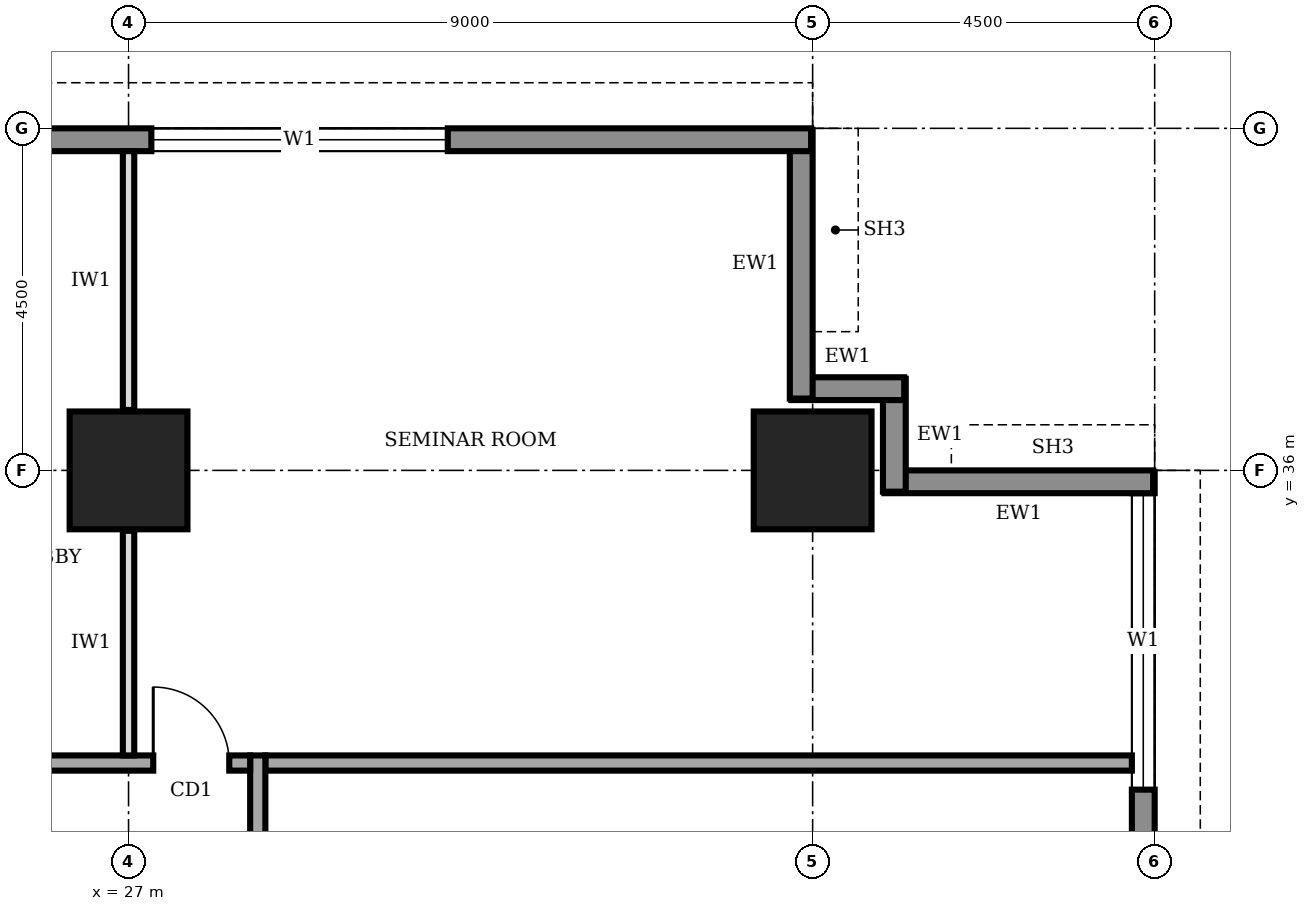
"""IFC4 building model, lengths in metres.
Left out: names, types, materials, properties, quantities, classifications, styles, units other than length and angle.
Written with IfcOpenShell. Run it as: python <this file> out.ifc"""

import sys

from ifc_helpers import new_model, si_unit, direction, frame, frame_2d, origin, origin_2d, place, context, subcontext, project, spatial, rectangle, extrude, element, fill, save


model = new_model("IFC4")
c1 = context("Model", 3, precision=1e-05, world=origin(), true_north=direction((0.0, 1.0)))
c2 = subcontext(c1, "Body", "Model", "MODEL_VIEW")
j1 = project(units=[si_unit("LENGTHUNIT", "METRE"), si_unit("PLANEANGLEUNIT", "RADIAN")], contexts=[c1])
p1 = place(None, origin())
s1 = spatial("IfcSite", under=j1, at=p1, CompositionType="ELEMENT")
p2 = place(p1, origin())
s2 = spatial("IfcBuilding", under=s1, at=p2, CompositionType="ELEMENT")
p3 = place(p2, frame((0.0, 0.0, 217.0)))
s3 = spatial("IfcBuildingStorey", under=s2, at=p3, CompositionType="ELEMENT", Elevation=217.0)
for number, where, z_axis, x_axis in (
    (1, (27.0, 36.0, 0.0), (0.0, 0.0, 1.0), (1.0, 0.0, 0.0)),
    (2, (36.0, 36.0, 0.0), (0.0, 0.0, 1.0), (1.0, 0.0, 0.0)),
):
    element("IfcColumn", number, at=place(p3, frame(where, z_axis=z_axis, x_axis=x_axis)), inside=s3, PredefinedType="COLUMN", context=c2, shape_type="SweptSolid", body=[
        extrude(rectangle(XDim=1.55, YDim=1.55, at=origin_2d()), origin(), (0.0, 0.0, 1.0), 4.0),
    ])
p4 = place(p3, frame((40.35, 4.52, 0.0), z_axis=(0.0, 0.0, 1.0), x_axis=(0.0, 1.0, 0.0)))
e3 = element("IfcWall", 3, at=p4, inside=s3, PredefinedType="STANDARD", context=c2, shape_type="SweptSolid", body=[
    extrude(rectangle(XDim=31.46, YDim=0.3, at=frame_2d((15.73, 0.0))), origin(), (0.0, 0.0, 1.0), 3.75),
])
p5 = place(p4, frame((4.78, 0.0, 0.9)))
e4 = element("IfcOpeningElement", 4, at=p5, cuts=e3, PredefinedType="OPENING", context=c2, shape_type="SweptSolid", body=[
    extrude(rectangle(XDim=3.9, YDim=2.2, at=frame_2d((1.95, 1.1))), frame((0.0, 0.16, 0.0), z_axis=(0.0, -1.0, 0.0), x_axis=(1.0, 0.0, 0.0)), (0.0, 0.0, 1.0), 0.32),
])
p6 = place(p4, frame((9.28, 0.0, 0.9)))
e5 = element("IfcOpeningElement", 5, at=p6, cuts=e3, PredefinedType="OPENING", context=c2, shape_type="SweptSolid", body=[
    extrude(rectangle(XDim=3.9, YDim=2.2, at=frame_2d((1.95, 1.1))), frame((0.0, 0.16, 0.0), z_axis=(0.0, -1.0, 0.0), x_axis=(1.0, 0.0, 0.0)), (0.0, 0.0, 1.0), 0.32),
])
p7 = place(p4, frame((13.78, 0.0, 0.9)))
e6 = element("IfcOpeningElement", 6, at=p7, cuts=e3, PredefinedType="OPENING", context=c2, shape_type="SweptSolid", body=[
    extrude(rectangle(XDim=3.9, YDim=2.2, at=frame_2d((1.95, 1.1))), frame((0.0, 0.16, 0.0), z_axis=(0.0, -1.0, 0.0), x_axis=(1.0, 0.0, 0.0)), (0.0, 0.0, 1.0), 0.32),
])
p8 = place(p4, frame((18.28, 0.0, 0.9)))
e7 = element("IfcOpeningElement", 7, at=p8, cuts=e3, PredefinedType="OPENING", context=c2, shape_type="SweptSolid", body=[
    extrude(rectangle(XDim=3.9, YDim=2.2, at=frame_2d((1.95, 1.1))), frame((0.0, 0.16, 0.0), z_axis=(0.0, -1.0, 0.0), x_axis=(1.0, 0.0, 0.0)), (0.0, 0.0, 1.0), 0.32),
])
p9 = place(p4, frame((22.78, 0.0, 0.9)))
e8 = element("IfcOpeningElement", 8, at=p9, cuts=e3, PredefinedType="OPENING", context=c2, shape_type="SweptSolid", body=[
    extrude(rectangle(XDim=3.9, YDim=2.2, at=frame_2d((1.95, 1.1))), frame((0.0, 0.16, 0.0), z_axis=(0.0, -1.0, 0.0), x_axis=(1.0, 0.0, 0.0)), (0.0, 0.0, 1.0), 0.32),
])
p10 = place(p4, frame((27.28, 0.0, 0.9)))
e9 = element("IfcOpeningElement", 9, at=p10, cuts=e3, PredefinedType="OPENING", context=c2, shape_type="SweptSolid", body=[
    extrude(rectangle(XDim=3.9, YDim=2.2, at=frame_2d((1.95, 1.1))), frame((0.0, 0.16, 0.0), z_axis=(0.0, -1.0, 0.0), x_axis=(1.0, 0.0, 0.0)), (0.0, 0.0, 1.0), 0.32),
])
p11 = place(p3, frame((40.48, 35.85, 0.0), z_axis=(0.0, 0.0, 1.0), x_axis=(-1.0, 0.0, 0.0)))
e10 = element("IfcWall", 10, at=p11, inside=s3, PredefinedType="STANDARD", context=c2, shape_type="SweptSolid", body=[
    extrude(rectangle(XDim=3.535, YDim=0.3, at=frame_2d((1.768, 0.0))), origin(), (0.0, 0.0, 1.0), 2.85),
])
for number, where, z_axis, x_axis in (
    (11, (37.075, 35.72, 0.0), (0.0, 0.0, 1.0), (0.0, 1.0, 0.0)),
    (12, (37.205, 37.075, 0.0), (0.0, 0.0, 1.0), (-1.0, 0.0, 0.0)),
):
    element("IfcWall", number, at=place(p3, frame(where, z_axis=z_axis, x_axis=x_axis)), inside=s3, PredefinedType="STANDARD", context=c2, shape_type="SweptSolid", body=[
        extrude(rectangle(XDim=1.485, YDim=0.3, at=frame_2d((0.743, 0.0))), origin(), (0.0, 0.0, 1.0), 3.75),
    ])
p12 = place(p3, frame((35.85, 36.945, 0.0), z_axis=(0.0, 0.0, 1.0), x_axis=(0.0, 1.0, 0.0)))
e13 = element("IfcWall", 13, at=p12, inside=s3, PredefinedType="STANDARD", context=c2, shape_type="SweptSolid", body=[
    extrude(rectangle(XDim=3.535, YDim=0.3, at=frame_2d((1.768, 0.0))), origin(), (0.0, 0.0, 1.0), 2.85),
])
p13 = place(p3, frame((35.98, 40.35, 0.0), z_axis=(0.0, 0.0, 1.0), x_axis=(-1.0, 0.0, 0.0)))
e14 = element("IfcWall", 14, at=p13, inside=s3, PredefinedType="STANDARD", context=c2, shape_type="SweptSolid", body=[
    extrude(rectangle(XDim=31.46, YDim=0.3, at=frame_2d((15.73, 0.0))), origin(), (0.0, 0.0, 1.0), 3.75),
])
p14 = place(p13, frame((27.28, 0.0, 0.9)))
e15 = element("IfcOpeningElement", 15, at=p14, cuts=e14, PredefinedType="OPENING", context=c2, shape_type="SweptSolid", body=[
    extrude(rectangle(XDim=3.9, YDim=2.2, at=frame_2d((1.95, 1.1))), frame((0.0, 0.16, 0.0), z_axis=(0.0, -1.0, 0.0), x_axis=(1.0, 0.0, 0.0)), (0.0, 0.0, 1.0), 0.32),
])
p15 = place(p13, frame((22.78, 0.0, 0.9)))
e16 = element("IfcOpeningElement", 16, at=p15, cuts=e14, PredefinedType="OPENING", context=c2, shape_type="SweptSolid", body=[
    extrude(rectangle(XDim=3.9, YDim=2.2, at=frame_2d((1.95, 1.1))), frame((0.0, 0.16, 0.0), z_axis=(0.0, -1.0, 0.0), x_axis=(1.0, 0.0, 0.0)), (0.0, 0.0, 1.0), 0.32),
])
p16 = place(p13, frame((4.78, 0.0, 0.9)))
e17 = element("IfcOpeningElement", 17, at=p16, cuts=e14, PredefinedType="OPENING", context=c2, shape_type="SweptSolid", body=[
    extrude(rectangle(XDim=3.9, YDim=2.2, at=frame_2d((1.95, 1.1))), frame((0.0, 0.16, 0.0), z_axis=(0.0, -1.0, 0.0), x_axis=(1.0, 0.0, 0.0)), (0.0, 0.0, 1.0), 0.32),
])
p17 = place(p3, frame((28.7, 8.45, 0.0), z_axis=(0.0, 0.0, 1.0), x_axis=(0.0, 1.0, 0.0)))
e18 = element("IfcWall", 18, at=p17, inside=s3, PredefinedType="SOLIDWALL", context=c2, shape_type="SweptSolid", body=[
    extrude(rectangle(XDim=23.8, YDim=0.2, at=frame_2d((11.9, 0.0))), origin(), (0.0, 0.0, 1.0), 3.75),
])
p18 = place(p17, frame((3.775, 0.0, 0.0)))
e19 = element("IfcOpeningElement", 19, at=p18, cuts=e18, PredefinedType="OPENING", context=c2, shape_type="SweptSolid", body=[
    extrude(rectangle(XDim=1.8, YDim=2.1, at=frame_2d((0.9, 1.05))), frame((0.0, 0.11, 0.0), z_axis=(0.0, -1.0, 0.0), x_axis=(1.0, 0.0, 0.0)), (0.0, 0.0, 1.0), 0.22),
])
p19 = place(p17, frame((11.3, 0.0, 0.0)))
e20 = element("IfcOpeningElement", 20, at=p19, cuts=e18, PredefinedType="OPENING", context=c2, shape_type="SweptSolid", body=[
    extrude(rectangle(XDim=1.0, YDim=2.1, at=frame_2d((0.5, 1.05))), frame((0.0, 0.11, 0.0), z_axis=(0.0, -1.0, 0.0), x_axis=(1.0, 0.0, 0.0)), (0.0, 0.0, 1.0), 0.22),
])
p20 = place(p17, frame((18.025, 0.0, 0.0)))
e21 = element("IfcOpeningElement", 21, at=p20, cuts=e18, PredefinedType="OPENING", context=c2, shape_type="SweptSolid", body=[
    extrude(rectangle(XDim=1.8, YDim=2.1, at=frame_2d((0.9, 1.05))), frame((0.0, 0.11, 0.0), z_axis=(0.0, -1.0, 0.0), x_axis=(1.0, 0.0, 0.0)), (0.0, 0.0, 1.0), 0.22),
])
p21 = place(p3, frame((28.6, 32.15, 0.0), z_axis=(0.0, 0.0, 1.0), x_axis=(-1.0, 0.0, 0.0)))
e22 = element("IfcWall", 22, at=p21, inside=s3, PredefinedType="SOLIDWALL", context=c2, shape_type="SweptSolid", body=[
    extrude(rectangle(XDim=16.9, YDim=0.2, at=frame_2d((8.45, 0.0))), origin(), (0.0, 0.0, 1.0), 3.75),
])
p22 = place(p21, frame((15.425, 0.0, 0.0)))
e23 = element("IfcOpeningElement", 23, at=p22, cuts=e22, PredefinedType="OPENING", context=c2, shape_type="SweptSolid", body=[
    extrude(rectangle(XDim=1.0, YDim=2.1, at=frame_2d((0.5, 1.05))), frame((0.0, 0.11, 0.0), z_axis=(0.0, -1.0, 0.0), x_axis=(1.0, 0.0, 0.0)), (0.0, 0.0, 1.0), 0.22),
])
p23 = place(p21, frame((12.35, 0.0, 0.0)))
e24 = element("IfcOpeningElement", 24, at=p23, cuts=e22, PredefinedType="OPENING", context=c2, shape_type="SweptSolid", body=[
    extrude(rectangle(XDim=1.0, YDim=2.1, at=frame_2d((0.5, 1.05))), frame((0.0, 0.11, 0.0), z_axis=(0.0, -1.0, 0.0), x_axis=(1.0, 0.0, 0.0)), (0.0, 0.0, 1.0), 0.22),
])
p24 = place(p21, frame((5.6, 0.0, 0.0)))
e25 = element("IfcOpeningElement", 25, at=p24, cuts=e22, PredefinedType="OPENING", context=c2, shape_type="SweptSolid", body=[
    extrude(rectangle(XDim=1.0, YDim=2.1, at=frame_2d((0.5, 1.05))), frame((0.0, 0.11, 0.0), z_axis=(0.0, -1.0, 0.0), x_axis=(1.0, 0.0, 0.0)), (0.0, 0.0, 1.0), 0.22),
])
p25 = place(p21, frame((0.275, 0.0, 0.0)))
e26 = element("IfcOpeningElement", 26, at=p25, cuts=e22, PredefinedType="OPENING", context=c2, shape_type="SweptSolid", body=[
    extrude(rectangle(XDim=1.0, YDim=2.1, at=frame_2d((0.5, 1.05))), frame((0.0, 0.11, 0.0), z_axis=(0.0, -1.0, 0.0), x_axis=(1.0, 0.0, 0.0)), (0.0, 0.0, 1.0), 0.22),
])
p26 = place(p3, frame((28.8, 32.15, 0.0), z_axis=(0.0, 0.0, 1.0), x_axis=(1.0, 0.0, 0.0)))
e27 = element("IfcWall", 27, at=p26, inside=s3, PredefinedType="SOLIDWALL", context=c2, shape_type="SweptSolid", body=[
    extrude(rectangle(XDim=11.4, YDim=0.2, at=frame_2d((5.7, 0.0))), origin(), (0.0, 0.0, 1.0), 3.75),
])
p27 = place(p3, frame((27.0, 32.25, 0.0), z_axis=(0.0, 0.0, 1.0), x_axis=(0.0, 1.0, 0.0)))
e28 = element("IfcWall", 28, at=p27, inside=s3, PredefinedType="PARTITIONING", context=c2, shape_type="SweptSolid", body=[
    extrude(rectangle(XDim=2.955, YDim=0.15, at=frame_2d((1.478, 0.0))), origin(), (0.0, 0.0, 1.0), 2.85),
])
p28 = place(p3, frame((27.0, 36.795, 0.0), z_axis=(0.0, 0.0, 1.0), x_axis=(0.0, 1.0, 0.0)))
e29 = element("IfcWall", 29, at=p28, inside=s3, PredefinedType="PARTITIONING", context=c2, shape_type="SweptSolid", body=[
    extrude(rectangle(XDim=3.405, YDim=0.15, at=frame_2d((1.703, 0.0))), origin(), (0.0, 0.0, 1.0), 2.85),
])
p29 = place(p10, origin())
e30 = element("IfcWindow", 30, at=p29, inside=s3, PartitioningType="SINGLE_PANEL", PredefinedType="WINDOW", context=c2, shape_type="SweptSolid", body=[
    extrude(rectangle(XDim=3.9, YDim=2.2, at=frame_2d((1.95, 1.1))), frame((0.0, 0.03, 0.0), z_axis=(0.0, -1.0, 0.0), x_axis=(1.0, 0.0, 0.0)), (0.0, 0.0, 1.0), 0.06),
])
fill(e9, e30)
p30 = place(p16, origin())
e31 = element("IfcWindow", 31, at=p30, inside=s3, PartitioningType="SINGLE_PANEL", PredefinedType="WINDOW", context=c2, shape_type="SweptSolid", body=[
    extrude(rectangle(XDim=3.9, YDim=2.2, at=frame_2d((1.95, 1.1))), frame((0.0, 0.03, 0.0), z_axis=(0.0, -1.0, 0.0), x_axis=(1.0, 0.0, 0.0)), (0.0, 0.0, 1.0), 0.06),
])
fill(e17, e31)
p31 = place(p25, frame((1.0, 0.0, 0.0), z_axis=(0.0, 0.0, 1.0), x_axis=(-1.0, 0.0, 0.0)))
e32 = element("IfcDoor", 32, at=p31, inside=s3, OperationType="SINGLE_SWING_LEFT", PredefinedType="DOOR", context=c2, shape_type="SweptSolid", body=[
    extrude(rectangle(XDim=1.0, YDim=2.1, at=frame_2d((0.5, 1.05))), frame((0.0, 0.025, 0.0), z_axis=(0.0, -1.0, 0.0), x_axis=(1.0, 0.0, 0.0)), (0.0, 0.0, 1.0), 0.05),
])
fill(e26, e32)
save(model, sys.argv[1])
